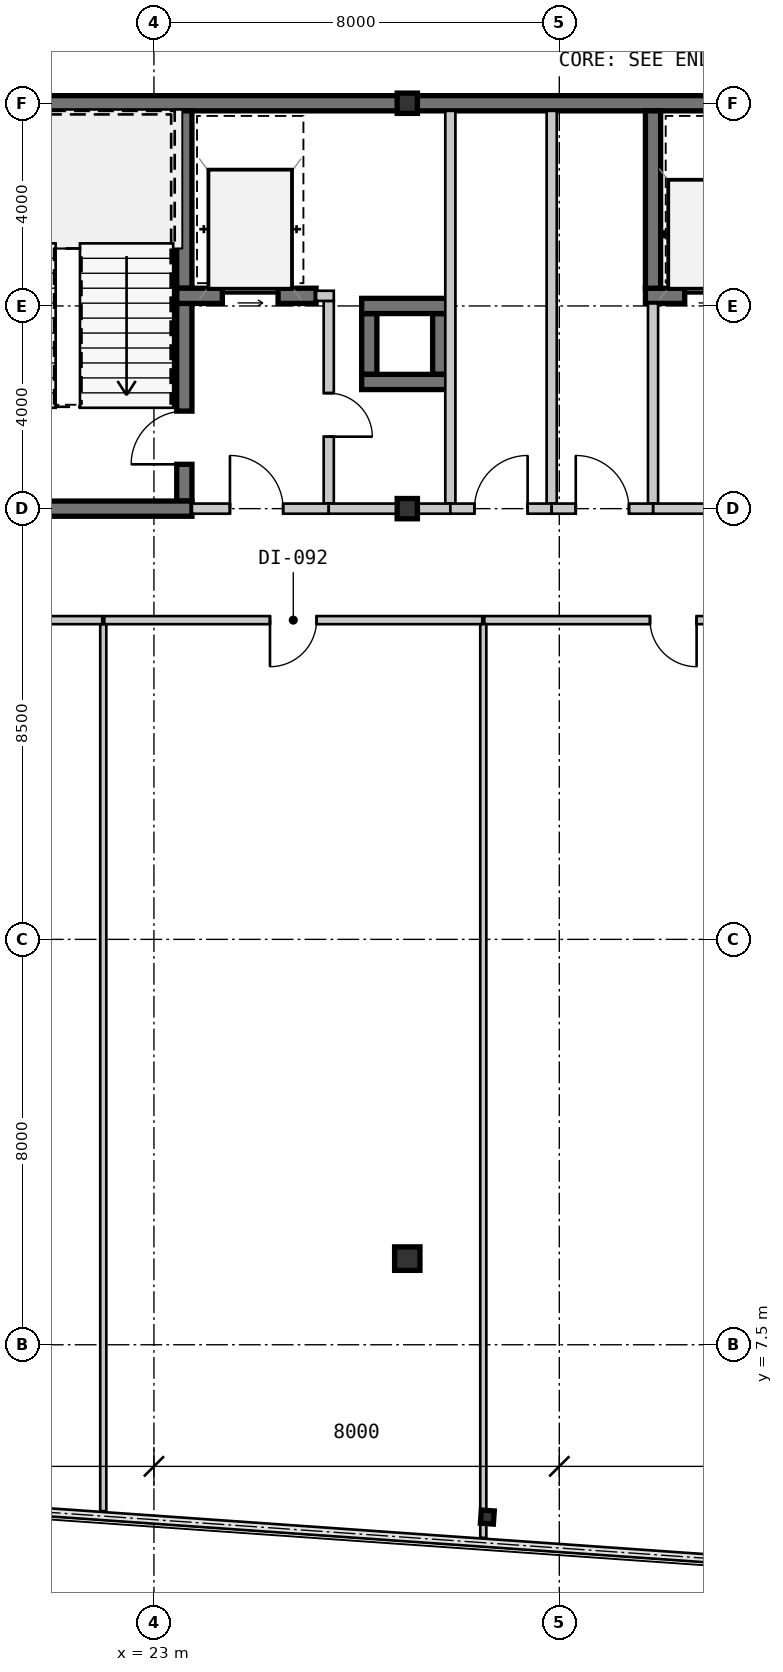
"""IFC4 building model, lengths in metres.
Left out: names, types, materials, properties, quantities, classifications, styles, units other than length and angle.
Written with IfcOpenShell. Run it as: python <this file> out.ifc"""

import sys

from ifc_helpers import new_model, si_unit, direction, frame, frame_2d, origin, origin_2d, place, context, subcontext, project, spatial, rectangle, hollow_rectangle, i_section, extrude, source, transform, mapped, element, fill, save


model = new_model("IFC4")
c1 = context("Model", 3, precision=1e-05, world=origin(), true_north=direction((0.0, 1.0)))
c2 = subcontext(c1, "Body", "Model", "MODEL_VIEW")
j1 = project(units=[si_unit("LENGTHUNIT", "METRE"), si_unit("PLANEANGLEUNIT", "RADIAN")], contexts=[c1])
p1 = place(None, origin())
s1 = spatial("IfcSite", under=j1, at=p1, CompositionType="ELEMENT")
p2 = place(p1, origin())
s2 = spatial("IfcBuilding", under=s1, at=p2, CompositionType="ELEMENT")
p3 = place(p2, frame((0.0, 0.0, 133.0)))
s3 = spatial("IfcBuildingStorey", under=s2, at=p3, CompositionType="ELEMENT", Elevation=133.0)
m1 = source(origin(), c2, "Body", "SweptSolid", [
    extrude(hollow_rectangle(XDim=0.4, YDim=0.4, WallThickness=0.016, at=origin_2d()), origin(), (0.0, 0.0, 1.0), 3.15),
])
for number, where, z_axis, x_axis in (
    (1, (28.0, 24.0, 0.0), (0.0, 0.0, 1.0), (1.0, 0.0, 0.0)),
    (2, (28.0, 32.0, 0.0), (0.0, 0.0, 1.0), (1.0, 0.0, 0.0)),
):
    element("IfcColumn", number, at=place(p3, frame(where, z_axis=z_axis, x_axis=x_axis)), inside=s3, PredefinedType="COLUMN", context=c2, shape_type="MappedRepresentation", body=[
        mapped(m1, transform((0.0, 0.0, 0.0), scale=1.0)),
    ])
m2 = source(origin(), c2, "Body", "SweptSolid", [
    extrude(i_section(OverallWidth=0.5, OverallDepth=0.464, WebThickness=0.022, FlangeThickness=0.034, at=origin_2d()), origin(), (0.0, 0.0, 1.0), 3.15),
])
p4 = place(p3, frame((28.0, 9.2, 0.0), z_axis=(0.0, 0.0, 1.0), x_axis=(1.0, 0.0, 0.0)))
e3 = element("IfcColumn", 3, at=p4, inside=s3, PredefinedType="COLUMN", context=c2, shape_type="MappedRepresentation", body=[
    mapped(m2, transform((0.0, 0.0, 0.0), scale=1.0)),
])
m3 = source(origin(), c2, "Body", "SweptSolid", [
    extrude(i_section(OverallWidth=0.256, OverallDepth=0.26, WebThickness=0.01, FlangeThickness=0.017, at=origin_2d()), origin(), (0.0, 0.0, 1.0), 3.15),
])
p5 = place(p3, frame((29.58, 4.1, 0.0), z_axis=(0.0, 0.0, 1.0), x_axis=(0.99756405026, -0.069756473744, 0.0)))
e4 = element("IfcColumn", 4, at=p5, inside=s3, PredefinedType="COLUMN", context=c2, shape_type="MappedRepresentation", body=[
    mapped(m3, transform((0.0, 0.0, 0.0), scale=1.0)),
])
m4 = source(origin(), c2, "Body", "SweptSolid", [
    extrude(rectangle(XDim=9.15, YDim=0.3, at=frame_2d((4.575, 0.0))), origin(), (0.0, 0.0, 1.0), 2.93),
])
p6 = place(p3, frame((18.85, 32.0, 0.0), z_axis=(0.0, 0.0, 1.0), x_axis=(1.0, 0.0, 0.0)))
e5 = element("IfcWall", 5, at=p6, inside=s3, PredefinedType="SHEAR", context=c2, shape_type="MappedRepresentation", body=[
    mapped(m4, transform((0.0, 0.0, 0.0), scale=1.0)),
])
m5 = source(origin(), c2, "Body", "SweptSolid", [
    extrude(rectangle(XDim=11.2, YDim=0.3, at=frame_2d((5.6, 0.0))), origin(), (0.0, 0.0, 1.0), 2.93),
])
p7 = place(p3, frame((28.0, 32.0, 0.0), z_axis=(0.0, 0.0, 1.0), x_axis=(1.0, 0.0, 0.0)))
e6 = element("IfcWall", 6, at=p7, inside=s3, PredefinedType="SHEAR", context=c2, shape_type="MappedRepresentation", body=[
    mapped(m5, transform((0.0, 0.0, 0.0), scale=1.0)),
])
m6 = source(origin(), c2, "Body", "SweptSolid", [
    extrude(rectangle(XDim=3.5, YDim=0.3, at=frame_2d((1.75, 0.0))), origin(), (0.0, 0.0, 1.0), 2.93),
])
p8 = place(p3, frame((23.6, 28.35, 0.0), z_axis=(0.0, 0.0, 1.0), x_axis=(0.0, 1.0, 0.0)))
e7 = element("IfcWall", 7, at=p8, inside=s3, PredefinedType="SHEAR", context=c2, shape_type="MappedRepresentation", body=[
    mapped(m6, transform((0.0, 0.0, 0.0), scale=1.0)),
])
m7 = source(origin(), c2, "Body", "SweptSolid", [
    extrude(rectangle(XDim=3.9, YDim=0.3, at=frame_2d((1.95, 0.0))), origin(), (0.0, 0.0, 1.0), 2.93),
])
p9 = place(p3, frame((23.6, 24.15, 0.0), z_axis=(0.0, 0.0, 1.0), x_axis=(0.0, 1.0, 0.0)))
e8 = element("IfcWall", 8, at=p9, inside=s3, PredefinedType="SHEAR", context=c2, shape_type="MappedRepresentation", body=[
    mapped(m7, transform((0.0, 0.0, 0.0), scale=1.0)),
])
m8 = source(origin(), c2, "Body", "SweptSolid", [
    extrude(rectangle(XDim=1.05, YDim=2.1, at=frame_2d((0.525, 1.05))), frame((0.0, 0.16, 0.0), z_axis=(0.0, -1.0, 0.0), x_axis=(1.0, 0.0, 0.0)), (0.0, 0.0, 1.0), 0.32),
])
p10 = place(p9, frame((0.725, 0.0, 0.0)))
e9 = element("IfcOpeningElement", 9, at=p10, cuts=e8, PredefinedType="OPENING", context=c2, shape_type="MappedRepresentation", body=[
    mapped(m8, transform((0.0, 0.0, 0.0), scale=1.0)),
])
m9 = source(origin(), c2, "Body", "SweptSolid", [
    extrude(rectangle(XDim=4.9, YDim=0.3, at=frame_2d((2.45, 0.0))), origin(), (0.0, 0.0, 1.0), 2.93),
])
p11 = place(p3, frame((18.85, 24.0, 0.0), z_axis=(0.0, 0.0, 1.0), x_axis=(1.0, 0.0, 0.0)))
e10 = element("IfcWall", 10, at=p11, inside=s3, PredefinedType="SHEAR", context=c2, shape_type="MappedRepresentation", body=[
    mapped(m9, transform((0.0, 0.0, 0.0), scale=1.0)),
])
m10 = source(origin(), c2, "Body", "SweptSolid", [
    extrude(rectangle(XDim=2.75, YDim=0.3, at=frame_2d((1.375, 0.0))), origin(), (0.0, 0.0, 1.0), 2.93),
])
p12 = place(p3, frame((23.45, 28.2, 0.0), z_axis=(0.0, 0.0, 1.0), x_axis=(1.0, 0.0, 0.0)))
e11 = element("IfcWall", 11, at=p12, inside=s3, PredefinedType="SHEAR", context=c2, shape_type="MappedRepresentation", body=[
    mapped(m10, transform((0.0, 0.0, 0.0), scale=1.0)),
])
m11 = source(origin(), c2, "Body", "SweptSolid", [
    extrude(rectangle(XDim=1.1, YDim=2.15, at=frame_2d((0.55, 1.075))), frame((0.0, 0.16, 0.0), z_axis=(0.0, -1.0, 0.0), x_axis=(1.0, 0.0, 0.0)), (0.0, 0.0, 1.0), 0.32),
])
p13 = place(p12, frame((0.9, 0.0, 0.0)))
e12 = element("IfcOpeningElement", 12, at=p13, cuts=e11, PredefinedType="OPENING", context=c2, shape_type="MappedRepresentation", body=[
    mapped(m11, transform((0.0, 0.0, 0.0), scale=1.0)),
])
m12 = source(origin(), c2, "Body", "SweptSolid", [
    extrude(rectangle(XDim=4.0, YDim=0.2, at=frame_2d((2.0, 0.0))), origin(), (0.0, 0.0, 1.0), 2.93),
])
p14 = place(p3, frame((26.45, 24.1, 0.0), z_axis=(0.0, 0.0, 1.0), x_axis=(0.0, 1.0, 0.0)))
e13 = element("IfcWall", 13, at=p14, inside=s3, PredefinedType="SOLIDWALL", context=c2, shape_type="MappedRepresentation", body=[
    mapped(m12, transform((0.0, 0.0, 0.0), scale=1.0)),
])
m13 = source(origin(), c2, "Body", "SweptSolid", [
    extrude(rectangle(XDim=0.86, YDim=2.1, at=frame_2d((0.43, 1.05))), frame((0.0, 0.11, 0.0), z_axis=(0.0, -1.0, 0.0), x_axis=(1.0, 0.0, 0.0)), (0.0, 0.0, 1.0), 0.22),
])
p15 = place(p14, frame((1.32, 0.0, 0.0)))
e14 = element("IfcOpeningElement", 14, at=p15, cuts=e13, PredefinedType="OPENING", context=c2, shape_type="MappedRepresentation", body=[
    mapped(m13, transform((0.0, 0.0, 0.0), scale=1.0)),
])
m14 = source(origin(), c2, "Body", "SweptSolid", [
    extrude(rectangle(XDim=2.7, YDim=0.2, at=frame_2d((1.35, 0.0))), origin(), (0.0, 0.0, 1.0), 2.47),
])
p16 = place(p3, frame((23.75, 24.0, 0.0), z_axis=(0.0, 0.0, 1.0), x_axis=(1.0, 0.0, 0.0)))
e15 = element("IfcWall", 15, at=p16, inside=s3, PredefinedType="SOLIDWALL", context=c2, shape_type="MappedRepresentation", body=[
    mapped(m14, transform((0.0, 0.0, 0.0), scale=1.0)),
])
m15 = source(origin(), c2, "Body", "SweptSolid", [
    extrude(rectangle(XDim=1.05, YDim=2.1, at=frame_2d((0.525, 1.05))), frame((0.0, 0.11, 0.0), z_axis=(0.0, -1.0, 0.0), x_axis=(1.0, 0.0, 0.0)), (0.0, 0.0, 1.0), 0.22),
])
p17 = place(p16, frame((0.75, 0.0, 0.0)))
e16 = element("IfcOpeningElement", 16, at=p17, cuts=e15, PredefinedType="OPENING", context=c2, shape_type="MappedRepresentation", body=[
    mapped(m15, transform((0.0, 0.0, 0.0), scale=1.0)),
])
m16 = source(origin(), c2, "Body", "SweptSolid", [
    extrude(rectangle(XDim=1.2, YDim=0.3, at=frame_2d((0.6, 0.0))), origin(), (0.0, 0.0, 1.0), 2.93),
])
for number, where, z_axis, x_axis in (
    (17, (28.65, 26.65, 0.0), (0.0, 0.0, 1.0), (0.0, 1.0, 0.0)),
    (18, (27.25, 27.85, 0.0), (0.0, 0.0, 1.0), (0.0, -1.0, 0.0)),
):
    element("IfcWall", number, at=place(p3, frame(where, z_axis=z_axis, x_axis=x_axis)), inside=s3, PredefinedType="SHEAR", context=c2, shape_type="MappedRepresentation", body=[
        mapped(m16, transform((0.0, 0.0, 0.0), scale=1.0)),
    ])
m17 = source(origin(), c2, "Body", "SweptSolid", [
    extrude(rectangle(XDim=1.7, YDim=0.3, at=frame_2d((0.85, 0.0))), origin(), (0.0, 0.0, 1.0), 2.93),
])
for number, where, z_axis, x_axis in (
    (19, (28.8, 28.0, 0.0), (0.0, 0.0, 1.0), (-1.0, 0.0, 0.0)),
    (20, (27.1, 26.5, 0.0), (0.0, 0.0, 1.0), (1.0, 0.0, 0.0)),
):
    element("IfcWall", number, at=place(p3, frame(where, z_axis=z_axis, x_axis=x_axis)), inside=s3, PredefinedType="SHEAR", context=c2, shape_type="MappedRepresentation", body=[
        mapped(m17, transform((0.0, 0.0, 0.0), scale=1.0)),
    ])
m18 = source(origin(), c2, "Body", "SweptSolid", [
    extrude(rectangle(XDim=2.6, YDim=0.3, at=frame_2d((1.3, 0.0))), origin(), (0.0, 0.0, 1.0), 2.93),
])
p18 = place(p3, frame((32.7, 28.2, 0.0), z_axis=(0.0, 0.0, 1.0), x_axis=(1.0, 0.0, 0.0)))
e21 = element("IfcWall", 21, at=p18, inside=s3, PredefinedType="SHEAR", context=c2, shape_type="MappedRepresentation", body=[
    mapped(m18, transform((0.0, 0.0, 0.0), scale=1.0)),
])
m19 = source(origin(), c2, "Body", "SweptSolid", [
    extrude(rectangle(XDim=1.05, YDim=2.15, at=frame_2d((0.525, 1.075))), frame((0.0, 0.16, 0.0), z_axis=(0.0, -1.0, 0.0), x_axis=(1.0, 0.0, 0.0)), (0.0, 0.0, 1.0), 0.32),
])
p19 = place(p18, frame((0.775, 0.0, 0.0)))
e22 = element("IfcOpeningElement", 22, at=p19, cuts=e21, PredefinedType="OPENING", context=c2, shape_type="MappedRepresentation", body=[
    mapped(m19, transform((0.0, 0.0, 0.0), scale=1.0)),
])
p20 = place(p3, frame((32.85, 31.85, 0.0), z_axis=(0.0, 0.0, 1.0), x_axis=(0.0, -1.0, 0.0)))
e23 = element("IfcWall", 23, at=p20, inside=s3, PredefinedType="SHEAR", context=c2, shape_type="MappedRepresentation", body=[
    mapped(m6, transform((0.0, 0.0, 0.0), scale=1.0)),
])
m20 = source(origin(), c2, "Body", "SweptSolid", [
    extrude(rectangle(XDim=3.95, YDim=0.2, at=frame_2d((1.975, 0.0))), origin(), (0.0, 0.0, 1.0), 2.93),
])
p21 = place(p3, frame((32.85, 24.1, 0.0), z_axis=(0.0, 0.0, 1.0), x_axis=(0.0, 1.0, 0.0)))
e24 = element("IfcWall", 24, at=p21, inside=s3, PredefinedType="SOLIDWALL", context=c2, shape_type="MappedRepresentation", body=[
    mapped(m20, transform((0.0, 0.0, 0.0), scale=1.0)),
])
m21 = source(origin(), c2, "Body", "SweptSolid", [
    extrude(rectangle(XDim=6.35, YDim=0.2, at=frame_2d((3.175, 0.0))), origin(), (0.0, 0.0, 1.0), 2.47),
])
p22 = place(p3, frame((39.2, 24.0, 0.0), z_axis=(0.0, 0.0, 1.0), x_axis=(-1.0, 0.0, 0.0)))
e25 = element("IfcWall", 25, at=p22, inside=s3, PredefinedType="SOLIDWALL", context=c2, shape_type="MappedRepresentation", body=[
    mapped(m21, transform((0.0, 0.0, 0.0), scale=1.0)),
])
p23 = place(p22, frame((2.65, 0.0, 0.0)))
e26 = element("IfcOpeningElement", 26, at=p23, cuts=e25, PredefinedType="OPENING", context=c2, shape_type="MappedRepresentation", body=[
    mapped(m15, transform((0.0, 0.0, 0.0), scale=1.0)),
])
m22 = source(origin(), c2, "Body", "SweptSolid", [
    extrude(rectangle(XDim=7.75, YDim=0.2, at=frame_2d((3.875, 0.0))), origin(), (0.0, 0.0, 1.0), 2.93),
])
p24 = place(p3, frame((28.85, 31.85, 0.0), z_axis=(0.0, 0.0, 1.0), x_axis=(0.0, -1.0, 0.0)))
e27 = element("IfcWall", 27, at=p24, inside=s3, PredefinedType="SOLIDWALL", context=c2, shape_type="MappedRepresentation", body=[
    mapped(m22, transform((0.0, 0.0, 0.0), scale=1.0)),
])
m23 = source(origin(), c2, "Body", "SweptSolid", [
    extrude(rectangle(XDim=2.4, YDim=0.2, at=frame_2d((1.2, 0.0))), origin(), (0.0, 0.0, 1.0), 2.47),
])
p25 = place(p3, frame((28.85, 24.0, 0.0), z_axis=(0.0, 0.0, 1.0), x_axis=(-1.0, 0.0, 0.0)))
e28 = element("IfcWall", 28, at=p25, inside=s3, PredefinedType="SOLIDWALL", context=c2, shape_type="MappedRepresentation", body=[
    mapped(m23, transform((0.0, 0.0, 0.0), scale=1.0)),
])
p26 = place(p3, frame((30.85, 31.85, 0.0), z_axis=(0.0, 0.0, 1.0), x_axis=(0.0, -1.0, 0.0)))
e29 = element("IfcWall", 29, at=p26, inside=s3, PredefinedType="SOLIDWALL", context=c2, shape_type="MappedRepresentation", body=[
    mapped(m22, transform((0.0, 0.0, 0.0), scale=1.0)),
])
m24 = source(origin(), c2, "Body", "SweptSolid", [
    extrude(rectangle(XDim=2.0, YDim=0.2, at=frame_2d((1.0, 0.0))), origin(), (0.0, 0.0, 1.0), 2.47),
])
p27 = place(p3, frame((30.85, 24.0, 0.0), z_axis=(0.0, 0.0, 1.0), x_axis=(-1.0, 0.0, 0.0)))
e30 = element("IfcWall", 30, at=p27, inside=s3, PredefinedType="SOLIDWALL", context=c2, shape_type="MappedRepresentation", body=[
    mapped(m24, transform((0.0, 0.0, 0.0), scale=1.0)),
])
p28 = place(p27, frame((0.475, 0.0, 0.0)))
e31 = element("IfcOpeningElement", 31, at=p28, cuts=e30, PredefinedType="OPENING", context=c2, shape_type="MappedRepresentation", body=[
    mapped(m15, transform((0.0, 0.0, 0.0), scale=1.0)),
])
p29 = place(p3, frame((32.85, 24.0, 0.0), z_axis=(0.0, 0.0, 1.0), x_axis=(-1.0, 0.0, 0.0)))
e32 = element("IfcWall", 32, at=p29, inside=s3, PredefinedType="SOLIDWALL", context=c2, shape_type="MappedRepresentation", body=[
    mapped(m24, transform((0.0, 0.0, 0.0), scale=1.0)),
])
p30 = place(p29, frame((0.475, 0.0, 0.0)))
e33 = element("IfcOpeningElement", 33, at=p30, cuts=e32, PredefinedType="OPENING", context=c2, shape_type="MappedRepresentation", body=[
    mapped(m15, transform((0.0, 0.0, 0.0), scale=1.0)),
])
m25 = source(origin(), c2, "Body", "SweptSolid", [
    extrude(rectangle(XDim=6.765, YDim=0.16, at=frame_2d((3.383, 0.0))), origin(), (0.0, 0.0, 1.0), 2.93),
])
p31 = place(p3, frame((21.979, 21.8, 0.0), z_axis=(0.0, 0.0, 1.0), x_axis=(-1.0, 0.0, 0.0)))
e34 = element("IfcWall", 34, at=p31, inside=s3, PredefinedType="PARTITIONING", context=c2, shape_type="MappedRepresentation", body=[
    mapped(m25, transform((0.0, 0.0, 0.0), scale=1.0)),
])
m26 = source(origin(), c2, "Body", "SweptSolid", [
    extrude(rectangle(XDim=0.92, YDim=2.1, at=frame_2d((0.46, 1.05))), frame((0.0, 0.09, 0.0), z_axis=(0.0, -1.0, 0.0), x_axis=(1.0, 0.0, 0.0)), (0.0, 0.0, 1.0), 0.18),
])
p32 = place(p31, frame((2.923, 0.0, 0.0)))
e35 = element("IfcOpeningElement", 35, at=p32, cuts=e34, PredefinedType="OPENING", context=c2, shape_type="MappedRepresentation", body=[
    mapped(m26, transform((0.0, 0.0, 0.0), scale=1.0)),
])
m27 = source(origin(), c2, "Body", "SweptSolid", [
    extrude(rectangle(XDim=7.459, YDim=0.16, at=frame_2d((3.73, 0.0))), origin(), (0.0, 0.0, 1.0), 2.93),
])
p33 = place(p3, frame((29.48, 21.8, 0.0), z_axis=(0.0, 0.0, 1.0), x_axis=(-1.0, 0.0, 0.0)))
e36 = element("IfcWall", 36, at=p33, inside=s3, PredefinedType="PARTITIONING", context=c2, shape_type="MappedRepresentation", body=[
    mapped(m27, transform((0.0, 0.0, 0.0), scale=1.0)),
])
p34 = place(p33, frame((3.27, 0.0, 0.0)))
e37 = element("IfcOpeningElement", 37, at=p34, cuts=e36, PredefinedType="OPENING", context=c2, shape_type="MappedRepresentation", body=[
    mapped(m26, transform((0.0, 0.0, 0.0), scale=1.0)),
])
p35 = place(p3, frame((36.98, 21.8, 0.0), z_axis=(0.0, 0.0, 1.0), x_axis=(-1.0, 0.0, 0.0)))
e38 = element("IfcWall", 38, at=p35, inside=s3, PredefinedType="PARTITIONING", context=c2, shape_type="MappedRepresentation", body=[
    mapped(m27, transform((0.0, 0.0, 0.0), scale=1.0)),
])
p36 = place(p35, frame((3.27, 0.0, 0.0)))
e39 = element("IfcOpeningElement", 39, at=p36, cuts=e38, PredefinedType="OPENING", context=c2, shape_type="MappedRepresentation", body=[
    mapped(m26, transform((0.0, 0.0, 0.0), scale=1.0)),
])
m28 = source(origin(), c2, "Body", "SweptSolid", [
    extrude(rectangle(XDim=17.5, YDim=0.12, at=frame_2d((8.75, 0.0))), origin(), (0.0, 0.0, 1.0), 2.93),
])
p37 = place(p3, frame((22.0, 21.717, 0.0), z_axis=(0.0, 0.0, 1.0), x_axis=(0.0, -1.0, 0.0)))
e40 = element("IfcWall", 40, at=p37, inside=s3, PredefinedType="PARTITIONING", context=c2, shape_type="MappedRepresentation", body=[
    mapped(m28, transform((0.0, 0.0, 0.0), scale=1.0)),
])
m29 = source(origin(), c2, "Body", "SweptSolid", [
    extrude(rectangle(XDim=18.03, YDim=0.12, at=frame_2d((9.015, 0.0))), origin(), (0.0, 0.0, 1.0), 2.93),
])
p38 = place(p3, frame((29.5, 21.72, 0.0), z_axis=(0.0, 0.0, 1.0), x_axis=(0.0, -1.0, 0.0)))
e41 = element("IfcWall", 41, at=p38, inside=s3, PredefinedType="PARTITIONING", context=c2, shape_type="MappedRepresentation", body=[
    mapped(m29, transform((0.0, 0.0, 0.0), scale=1.0)),
])
m30 = source(origin(), c2, "Body", "SweptSolid", [
    extrude(rectangle(XDim=0.35, YDim=0.2, at=frame_2d((0.175, 0.0))), origin(), (0.0, 0.0, 1.0), 2.93),
])
p39 = place(p3, frame((26.2, 28.2, 0.0), z_axis=(0.0, 0.0, 1.0), x_axis=(1.0, 0.0, 0.0)))
e42 = element("IfcWall", 42, at=p39, inside=s3, PredefinedType="SOLIDWALL", context=c2, shape_type="MappedRepresentation", body=[
    mapped(m30, transform((0.0, 0.0, 0.0), scale=1.0)),
])
m31 = source(origin(), c2, "Body", "SweptSolid", [
    extrude(rectangle(XDim=1.05, YDim=2.1, at=frame_2d((0.525, 1.05))), frame((0.0, 0.025, 0.0), z_axis=(0.0, -1.0, 0.0), x_axis=(1.0, 0.0, 0.0)), (0.0, 0.0, 1.0), 0.05),
])
p40 = place(p10, origin())
e43 = element("IfcDoor", 43, at=p40, inside=s3, OperationType="SINGLE_SWING_LEFT", PredefinedType="DOOR", context=c2, shape_type="MappedRepresentation", body=[
    mapped(m31, transform((0.0, 0.0, 0.0), scale=1.0)),
])
fill(e9, e43)
m32 = source(origin(), c2, "Body", "SweptSolid", [
    extrude(rectangle(XDim=1.1, YDim=2.15, at=frame_2d((0.55, 1.075))), frame((0.0, 0.025, 0.0), z_axis=(0.0, -1.0, 0.0), x_axis=(1.0, 0.0, 0.0)), (0.0, 0.0, 1.0), 0.05),
])
p41 = place(p13, origin())
e44 = element("IfcDoor", 44, at=p41, inside=s3, OperationType="SLIDING_TO_LEFT", PredefinedType="DOOR", context=c2, shape_type="MappedRepresentation", body=[
    mapped(m32, transform((0.0, 0.0, 0.0), scale=1.0)),
])
fill(e12, e44)
p42 = place(p17, origin())
e45 = element("IfcDoor", 45, at=p42, inside=s3, OperationType="SINGLE_SWING_LEFT", PredefinedType="DOOR", context=c2, shape_type="MappedRepresentation", body=[
    mapped(m31, transform((0.0, 0.0, 0.0), scale=1.0)),
])
fill(e16, e45)
m33 = source(origin(), c2, "Body", "SweptSolid", [
    extrude(rectangle(XDim=1.05, YDim=2.15, at=frame_2d((0.525, 1.075))), frame((0.0, 0.025, 0.0), z_axis=(0.0, -1.0, 0.0), x_axis=(1.0, 0.0, 0.0)), (0.0, 0.0, 1.0), 0.05),
])
p43 = place(p19, origin())
e46 = element("IfcDoor", 46, at=p43, inside=s3, OperationType="SLIDING_TO_LEFT", PredefinedType="DOOR", context=c2, shape_type="MappedRepresentation", body=[
    mapped(m33, transform((0.0, 0.0, 0.0), scale=1.0)),
])
fill(e22, e46)
p44 = place(p28, frame((1.05, 0.0, 0.0), z_axis=(0.0, 0.0, 1.0), x_axis=(-1.0, 0.0, 0.0)))
e47 = element("IfcDoor", 47, at=p44, inside=s3, OperationType="SINGLE_SWING_RIGHT", PredefinedType="DOOR", context=c2, shape_type="MappedRepresentation", body=[
    mapped(m31, transform((0.0, 0.0, 0.0), scale=1.0)),
])
fill(e31, e47)
p45 = place(p30, frame((1.05, 0.0, 0.0), z_axis=(0.0, 0.0, 1.0), x_axis=(-1.0, 0.0, 0.0)))
e48 = element("IfcDoor", 48, at=p45, inside=s3, OperationType="SINGLE_SWING_LEFT", PredefinedType="DOOR", context=c2, shape_type="MappedRepresentation", body=[
    mapped(m31, transform((0.0, 0.0, 0.0), scale=1.0)),
])
fill(e33, e48)
m34 = source(origin(), c2, "Body", "SweptSolid", [
    extrude(rectangle(XDim=0.92, YDim=2.1, at=frame_2d((0.46, 1.05))), frame((0.0, 0.025, 0.0), z_axis=(0.0, -1.0, 0.0), x_axis=(1.0, 0.0, 0.0)), (0.0, 0.0, 1.0), 0.05),
])
p46 = place(p34, origin())
e49 = element("IfcDoor", 49, at=p46, inside=s3, OperationType="SINGLE_SWING_RIGHT", PredefinedType="DOOR", context=c2, shape_type="MappedRepresentation", body=[
    mapped(m34, transform((0.0, 0.0, 0.0), scale=1.0)),
])
fill(e37, e49)
p47 = place(p36, origin())
e50 = element("IfcDoor", 50, at=p47, inside=s3, OperationType="SINGLE_SWING_LEFT", PredefinedType="DOOR", context=c2, shape_type="MappedRepresentation", body=[
    mapped(m34, transform((0.0, 0.0, 0.0), scale=1.0)),
])
fill(e39, e50)
m35 = source(origin(), c2, "Body", "SweptSolid", [
    extrude(rectangle(XDim=0.86, YDim=2.1, at=frame_2d((0.43, 1.05))), frame((0.0, 0.025, 0.0), z_axis=(0.0, -1.0, 0.0), x_axis=(1.0, 0.0, 0.0)), (0.0, 0.0, 1.0), 0.05),
])
p48 = place(p15, frame((0.86, 0.0, 0.0), z_axis=(0.0, 0.0, 1.0), x_axis=(-1.0, 0.0, 0.0)))
e51 = element("IfcDoor", 51, at=p48, inside=s3, OperationType="SINGLE_SWING_RIGHT", PredefinedType="DOOR", context=c2, shape_type="MappedRepresentation", body=[
    mapped(m35, transform((0.0, 0.0, 0.0), scale=1.0)),
])
fill(e14, e51)
save(model, sys.argv[1])
